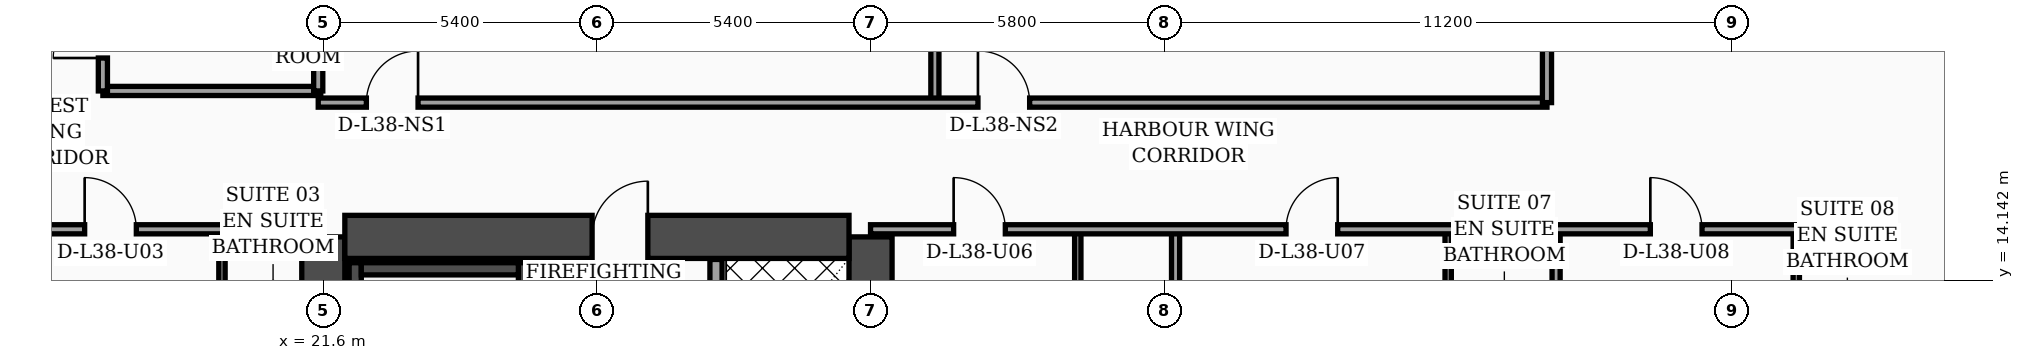
"""IFC4 building model, lengths in metres.
Left out: names, types, materials, properties, quantities, classifications, styles, units other than length and angle.
Written with IfcOpenShell. Run it as: python <this file> out.ifc"""

import sys

from ifc_helpers import new_model, si_unit, direction, frame, frame_2d, origin, place, context, subcontext, project, spatial, rectangle, extrude, element, fill, save


model = new_model("IFC4")
c1 = context("Model", 3, precision=1e-05, world=origin(), true_north=direction((0.0, 1.0)))
c2 = subcontext(c1, "Body", "Model", "MODEL_VIEW")
j1 = project(units=[si_unit("LENGTHUNIT", "METRE"), si_unit("PLANEANGLEUNIT", "RADIAN")], contexts=[c1])
p1 = place(None, origin())
s1 = spatial("IfcSite", under=j1, at=p1, CompositionType="ELEMENT")
p2 = place(p1, origin())
s2 = spatial("IfcBuilding", under=s1, at=p2, CompositionType="ELEMENT")
p3 = place(p2, frame((0.0, 0.0, 156.1)))
s3 = spatial("IfcBuildingStorey", under=s2, at=p3, CompositionType="ELEMENT", Elevation=156.1)
for number, where, z_axis, x_axis in (
    (1, (21.6, 4.6, 0.0), (0.0, 0.0, 1.0), (0.0, 1.0, 0.0)),
    (2, (32.4, 4.6, 0.0), (0.0, 0.0, 1.0), (0.0, 1.0, 0.0)),
):
    element("IfcWall", number, at=place(p3, frame(where, z_axis=z_axis, x_axis=x_axis)), inside=s3, PredefinedType="SHEAR", context=c2, shape_type="SweptSolid", body=[
        extrude(rectangle(XDim=10.4, YDim=0.85, at=frame_2d((5.2, 0.0))), origin(), (0.0, 0.0, 1.0), 3.56),
    ])
p4 = place(p3, frame((22.025, 15.0, 0.0), z_axis=(0.0, 0.0, 1.0), x_axis=(1.0, 0.0, 0.0)))
e3 = element("IfcWall", 3, at=p4, inside=s3, PredefinedType="SHEAR", context=c2, shape_type="SweptSolid", body=[
    extrude(rectangle(XDim=9.95, YDim=0.85, at=frame_2d((4.975, 0.0))), origin(), (0.0, 0.0, 1.0), 3.56),
])
p5 = place(p4, frame((4.88, 0.0, 0.0)))
e4 = element("IfcOpeningElement", 4, at=p5, cuts=e3, PredefinedType="OPENING", context=c2, shape_type="SweptSolid", body=[
    extrude(rectangle(XDim=1.1, YDim=2.2, at=frame_2d((0.55, 1.1))), frame((0.0, 0.435, 0.0), z_axis=(0.0, -1.0, 0.0), x_axis=(1.0, 0.0, 0.0)), (0.0, 0.0, 1.0), 0.87),
])
p6 = place(p3, frame((22.23, 5.025, 0.0), z_axis=(0.0, 0.0, 1.0), x_axis=(0.0, 1.0, 0.0)))
e5 = element("IfcWall", 5, at=p6, inside=s3, PredefinedType="SOLIDWALL", context=c2, shape_type="SweptSolid", body=[
    extrude(rectangle(XDim=9.465, YDim=0.24, at=frame_2d((4.732, 0.0))), origin(), (0.0, 0.0, 1.0), 3.56),
])
p7 = place(p3, frame((25.57, 5.025, 0.0), z_axis=(0.0, 0.0, 1.0), x_axis=(0.0, 1.0, 0.0)))
e6 = element("IfcWall", 6, at=p7, inside=s3, PredefinedType="SOLIDWALL", context=c2, shape_type="SweptSolid", body=[
    extrude(rectangle(XDim=9.465, YDim=0.24, at=frame_2d((4.732, 0.0))), origin(), (0.0, 0.0, 1.0), 3.56),
])
p8 = place(p7, frame((0.35, 0.0, 0.0)))
e7 = element("IfcOpeningElement", 7, at=p8, cuts=e6, PredefinedType="OPENING", context=c2, shape_type="SweptSolid", body=[
    extrude(rectangle(XDim=1.15, YDim=2.2, at=frame_2d((0.575, 1.1))), frame((0.0, 0.13, 0.0), z_axis=(0.0, -1.0, 0.0), x_axis=(1.0, 0.0, 0.0)), (0.0, 0.0, 1.0), 0.26),
])
p9 = place(p3, frame((22.35, 14.37, 0.0), z_axis=(0.0, 0.0, 1.0), x_axis=(1.0, 0.0, 0.0)))
e8 = element("IfcWall", 8, at=p9, inside=s3, PredefinedType="SOLIDWALL", context=c2, shape_type="SweptSolid", body=[
    extrude(rectangle(XDim=3.1, YDim=0.24, at=frame_2d((1.55, 0.0))), origin(), (0.0, 0.0, 1.0), 3.56),
])
p10 = place(p3, frame((59.23, 5.505, 0.0), z_axis=(0.0, 0.0, 1.0), x_axis=(-0.300509063924, 0.953778958931, 0.0)))
e9 = element("IfcWall", 9, at=p10, inside=s3, PredefinedType="SOLIDWALL", context=c2, shape_type="SweptSolid", body=[
    extrude(rectangle(XDim=30.814, YDim=0.32, at=frame_2d((15.407, 0.0))), origin(), (0.0, 0.0, 1.0), 3.56),
])
p11 = place(p10, frame((10.199, 0.0, 0.0)))
e10 = element("IfcOpeningElement", 10, at=p11, cuts=e9, PredefinedType="OPENING", context=c2, shape_type="SweptSolid", body=[
    extrude(rectangle(XDim=1.4, YDim=2.25, at=frame_2d((0.7, 1.125))), frame((0.0, 0.17, 0.0), z_axis=(0.0, -1.0, 0.0), x_axis=(1.0, 0.0, 0.0)), (0.0, 0.0, 1.0), 0.34),
])
p12 = place(p10, frame((1.6, 0.0, 0.75)))
e11 = element("IfcOpeningElement", 11, at=p12, cuts=e9, PredefinedType="OPENING", context=c2, shape_type="SweptSolid", body=[
    extrude(rectangle(XDim=1.5, YDim=1.6, at=frame_2d((0.75, 0.8))), frame((0.0, 0.17, 0.0), z_axis=(0.0, -1.0, 0.0), x_axis=(1.0, 0.0, 0.0)), (0.0, 0.0, 1.0), 0.34),
])
p13 = place(p10, frame((4.7, 0.0, 0.75)))
e12 = element("IfcOpeningElement", 12, at=p13, cuts=e9, PredefinedType="OPENING", context=c2, shape_type="SweptSolid", body=[
    extrude(rectangle(XDim=1.5, YDim=1.6, at=frame_2d((0.75, 0.8))), frame((0.0, 0.17, 0.0), z_axis=(0.0, -1.0, 0.0), x_axis=(1.0, 0.0, 0.0)), (0.0, 0.0, 1.0), 0.34),
])
p14 = place(p10, frame((7.8, 0.0, 0.75)))
e13 = element("IfcOpeningElement", 13, at=p14, cuts=e9, PredefinedType="OPENING", context=c2, shape_type="SweptSolid", body=[
    extrude(rectangle(XDim=1.5, YDim=1.6, at=frame_2d((0.75, 0.8))), frame((0.0, 0.17, 0.0), z_axis=(0.0, -1.0, 0.0), x_axis=(1.0, 0.0, 0.0)), (0.0, 0.0, 1.0), 0.34),
])
p15 = place(p10, frame((14.0, 0.0, 0.75)))
e14 = element("IfcOpeningElement", 14, at=p15, cuts=e9, PredefinedType="OPENING", context=c2, shape_type="SweptSolid", body=[
    extrude(rectangle(XDim=1.5, YDim=1.6, at=frame_2d((0.75, 0.8))), frame((0.0, 0.17, 0.0), z_axis=(0.0, -1.0, 0.0), x_axis=(1.0, 0.0, 0.0)), (0.0, 0.0, 1.0), 0.34),
])
p16 = place(p10, frame((17.1, 0.0, 0.75)))
e15 = element("IfcOpeningElement", 15, at=p16, cuts=e9, PredefinedType="OPENING", context=c2, shape_type="SweptSolid", body=[
    extrude(rectangle(XDim=1.5, YDim=1.6, at=frame_2d((0.75, 0.8))), frame((0.0, 0.17, 0.0), z_axis=(0.0, -1.0, 0.0), x_axis=(1.0, 0.0, 0.0)), (0.0, 0.0, 1.0), 0.34),
])
p17 = place(p10, frame((20.2, 0.0, 0.75)))
e16 = element("IfcOpeningElement", 16, at=p17, cuts=e9, PredefinedType="OPENING", context=c2, shape_type="SweptSolid", body=[
    extrude(rectangle(XDim=1.5, YDim=1.6, at=frame_2d((0.75, 0.8))), frame((0.0, 0.17, 0.0), z_axis=(0.0, -1.0, 0.0), x_axis=(1.0, 0.0, 0.0)), (0.0, 0.0, 1.0), 0.34),
])
p18 = place(p10, frame((23.3, 0.0, 0.75)))
e17 = element("IfcOpeningElement", 17, at=p18, cuts=e9, PredefinedType="OPENING", context=c2, shape_type="SweptSolid", body=[
    extrude(rectangle(XDim=1.5, YDim=1.6, at=frame_2d((0.75, 0.8))), frame((0.0, 0.17, 0.0), z_axis=(0.0, -1.0, 0.0), x_axis=(1.0, 0.0, 0.0)), (0.0, 0.0, 1.0), 0.34),
])
p19 = place(p10, frame((26.4, 0.0, 0.75)))
e18 = element("IfcOpeningElement", 18, at=p19, cuts=e9, PredefinedType="OPENING", context=c2, shape_type="SweptSolid", body=[
    extrude(rectangle(XDim=1.5, YDim=1.6, at=frame_2d((0.75, 0.8))), frame((0.0, 0.17, 0.0), z_axis=(0.0, -1.0, 0.0), x_axis=(1.0, 0.0, 0.0)), (0.0, 0.0, 1.0), 0.34),
])
p20 = place(p3, frame((29.35, 5.045, 0.0), z_axis=(0.0, 0.0, 1.0), x_axis=(0.0, 1.0, 0.0)))
e19 = element("IfcWall", 19, at=p20, inside=s3, PredefinedType="SOLIDWALL", context=c2, shape_type="SweptSolid", body=[
    extrude(rectangle(XDim=9.51, YDim=0.24, at=frame_2d((4.755, 0.0))), origin(), (0.0, 0.0, 1.0), 3.56),
])
p21 = place(p20, frame((0.55, 0.0, 0.0)))
e20 = element("IfcOpeningElement", 20, at=p21, cuts=e19, PredefinedType="OPENING", context=c2, shape_type="SweptSolid", body=[
    extrude(rectangle(XDim=1.3, YDim=2.35, at=frame_2d((0.65, 1.175))), frame((0.0, 0.13, 0.0), z_axis=(0.0, -1.0, 0.0), x_axis=(1.0, 0.0, 0.0)), (0.0, 0.0, 1.0), 0.26),
])
p22 = place(p3, frame((19.6, 2.44, 0.0), z_axis=(0.0, 0.0, 1.0), x_axis=(0.0, 1.0, 0.0)))
e21 = element("IfcWall", 21, at=p22, inside=s3, PredefinedType="PARTITIONING", context=c2, shape_type="SweptSolid", body=[
    extrude(rectangle(XDim=12.71, YDim=0.125, at=frame_2d((6.355, 0.0))), origin(), (0.0, 0.0, 1.0), 2.49),
])
p23 = place(p22, frame((4.34, 0.0, 0.0)))
e22 = element("IfcOpeningElement", 22, at=p23, cuts=e21, PredefinedType="OPENING", context=c2, shape_type="SweptSolid", body=[
    extrude(rectangle(XDim=0.96, YDim=2.2, at=frame_2d((0.48, 1.1))), frame((0.0, 0.073, 0.0), z_axis=(0.0, -1.0, 0.0), x_axis=(1.0, 0.0, 0.0)), (0.0, 0.0, 1.0), 0.145),
])
p24 = place(p22, frame((10.18, 0.0, 0.0)))
e23 = element("IfcOpeningElement", 23, at=p24, cuts=e21, PredefinedType="OPENING", context=c2, shape_type="SweptSolid", body=[
    extrude(rectangle(XDim=0.9, YDim=2.15, at=frame_2d((0.45, 1.075))), frame((0.0, 0.073, 0.0), z_axis=(0.0, -1.0, 0.0), x_axis=(1.0, 0.0, 0.0)), (0.0, 0.0, 1.0), 0.145),
])
p25 = place(p3, frame((15.15, 15.15, 0.0), z_axis=(0.0, 0.0, 1.0), x_axis=(1.0, 0.0, 0.0)))
e24 = element("IfcWall", 24, at=p25, inside=s3, PredefinedType="PARTITIONING", context=c2, shape_type="SweptSolid", body=[
    extrude(rectangle(XDim=6.45, YDim=0.18, at=frame_2d((3.225, 0.0))), origin(), (0.0, 0.0, 1.0), 2.49),
])
p26 = place(p25, frame((1.74, 0.0, 0.0)))
e25 = element("IfcOpeningElement", 25, at=p26, cuts=e24, PredefinedType="OPENING", context=c2, shape_type="SweptSolid", body=[
    extrude(rectangle(XDim=1.02, YDim=2.2, at=frame_2d((0.51, 1.1))), frame((0.0, 0.1, 0.0), z_axis=(0.0, -1.0, 0.0), x_axis=(1.0, 0.0, 0.0)), (0.0, 0.0, 1.0), 0.2),
])
p27 = place(p3, frame((17.25, 17.88, 0.0), z_axis=(0.0, 0.0, 1.0), x_axis=(1.0, 0.0, 0.0)))
e26 = element("IfcWall", 26, at=p27, inside=s3, PredefinedType="PARTITIONING", context=c2, shape_type="SweptSolid", body=[
    extrude(rectangle(XDim=4.3, YDim=0.18, at=frame_2d((2.15, 0.0))), origin(), (0.0, 0.0, 1.0), 3.56),
])
p28 = place(p3, frame((21.5, 17.88, 0.0), z_axis=(0.0, 0.0, 1.0), x_axis=(0.0, 1.0, 0.0)))
e27 = element("IfcWall", 27, at=p28, inside=s3, PredefinedType="PARTITIONING", context=c2, shape_type="SweptSolid", body=[
    extrude(rectangle(XDim=6.44, YDim=0.18, at=frame_2d((3.22, 0.0))), origin(), (0.0, 0.0, 1.0), 3.09),
])
p29 = place(p3, frame((17.25, 17.88, 0.0), z_axis=(0.0, 0.0, 1.0), x_axis=(0.0, 1.0, 0.0)))
e28 = element("IfcWall", 28, at=p29, inside=s3, PredefinedType="PARTITIONING", context=c2, shape_type="SweptSolid", body=[
    extrude(rectangle(XDim=6.44, YDim=0.18, at=frame_2d((3.22, 0.0))), origin(), (0.0, 0.0, 1.0), 3.09),
])
p30 = place(p29, frame((0.65, 0.0, 0.0)))
e29 = element("IfcOpeningElement", 29, at=p30, cuts=e28, PredefinedType="OPENING", context=c2, shape_type="SweptSolid", body=[
    extrude(rectangle(XDim=0.98, YDim=2.15, at=frame_2d((0.49, 1.075))), frame((0.0, 0.1, 0.0), z_axis=(0.0, -1.0, 0.0), x_axis=(1.0, 0.0, 0.0)), (0.0, 0.0, 1.0), 0.2),
])
p31 = place(p29, frame((3.27, 0.0, 0.0)))
e30 = element("IfcOpeningElement", 30, at=p31, cuts=e28, PredefinedType="OPENING", context=c2, shape_type="SweptSolid", body=[
    extrude(rectangle(XDim=0.96, YDim=2.2, at=frame_2d((0.48, 1.1))), frame((0.0, 0.1, 0.0), z_axis=(0.0, -1.0, 0.0), x_axis=(1.0, 0.0, 0.0)), (0.0, 0.0, 1.0), 0.2),
])
p32 = place(p3, frame((36.49, 2.44, 0.0), z_axis=(0.0, 0.0, 1.0), x_axis=(0.0, 1.0, 0.0)))
e31 = element("IfcWall", 31, at=p32, inside=s3, PredefinedType="PARTITIONING", context=c2, shape_type="SweptSolid", body=[
    extrude(rectangle(XDim=12.71, YDim=0.125, at=frame_2d((6.355, 0.0))), origin(), (0.0, 0.0, 1.0), 2.94),
])
p33 = place(p32, frame((4.35, 0.0, 0.0)))
e32 = element("IfcOpeningElement", 32, at=p33, cuts=e31, PredefinedType="OPENING", context=c2, shape_type="SweptSolid", body=[
    extrude(rectangle(XDim=0.96, YDim=2.2, at=frame_2d((0.48, 1.1))), frame((0.0, 0.073, 0.0), z_axis=(0.0, -1.0, 0.0), x_axis=(1.0, 0.0, 0.0)), (0.0, 0.0, 1.0), 0.145),
])
p34 = place(p32, frame((10.21, 0.0, 0.0)))
e33 = element("IfcOpeningElement", 33, at=p34, cuts=e31, PredefinedType="OPENING", context=c2, shape_type="SweptSolid", body=[
    extrude(rectangle(XDim=0.9, YDim=2.15, at=frame_2d((0.45, 1.075))), frame((0.0, 0.073, 0.0), z_axis=(0.0, -1.0, 0.0), x_axis=(1.0, 0.0, 0.0)), (0.0, 0.0, 1.0), 0.145),
])
p35 = place(p3, frame((43.8, 2.44, 0.0), z_axis=(0.0, 0.0, 1.0), x_axis=(0.0, 1.0, 0.0)))
e34 = element("IfcWall", 34, at=p35, inside=s3, PredefinedType="PARTITIONING", context=c2, shape_type="SweptSolid", body=[
    extrude(rectangle(XDim=12.71, YDim=0.125, at=frame_2d((6.355, 0.0))), origin(), (0.0, 0.0, 1.0), 3.04),
])
p36 = place(p35, frame((4.35, 0.0, 0.0)))
e35 = element("IfcOpeningElement", 35, at=p36, cuts=e34, PredefinedType="OPENING", context=c2, shape_type="SweptSolid", body=[
    extrude(rectangle(XDim=0.96, YDim=2.2, at=frame_2d((0.48, 1.1))), frame((0.0, 0.073, 0.0), z_axis=(0.0, -1.0, 0.0), x_axis=(1.0, 0.0, 0.0)), (0.0, 0.0, 1.0), 0.145),
])
p37 = place(p35, frame((10.21, 0.0, 0.0)))
e36 = element("IfcOpeningElement", 36, at=p37, cuts=e34, PredefinedType="OPENING", context=c2, shape_type="SweptSolid", body=[
    extrude(rectangle(XDim=0.9, YDim=2.15, at=frame_2d((0.45, 1.075))), frame((0.0, 0.073, 0.0), z_axis=(0.0, -1.0, 0.0), x_axis=(1.0, 0.0, 0.0)), (0.0, 0.0, 1.0), 0.145),
])
p38 = place(p3, frame((38.42, 2.44, 0.0), z_axis=(0.0, 0.0, 1.0), x_axis=(0.0, 1.0, 0.0)))
e37 = element("IfcWall", 37, at=p38, inside=s3, PredefinedType="PARTITIONING", context=c2, shape_type="SweptSolid", body=[
    extrude(rectangle(XDim=12.71, YDim=0.16, at=frame_2d((6.355, 0.0))), origin(), (0.0, 0.0, 1.0), 2.94),
])
p39 = place(p3, frame((50.67, 2.44, 0.0), z_axis=(0.0, 0.0, 1.0), x_axis=(0.0, 1.0, 0.0)))
e38 = element("IfcWall", 38, at=p39, inside=s3, PredefinedType="PARTITIONING", context=c2, shape_type="SweptSolid", body=[
    extrude(rectangle(XDim=12.71, YDim=0.125, at=frame_2d((6.355, 0.0))), origin(), (0.0, 0.0, 1.0), 3.04),
])
p40 = place(p39, frame((4.35, 0.0, 0.0)))
e39 = element("IfcOpeningElement", 39, at=p40, cuts=e38, PredefinedType="OPENING", context=c2, shape_type="SweptSolid", body=[
    extrude(rectangle(XDim=0.96, YDim=2.2, at=frame_2d((0.48, 1.1))), frame((0.0, 0.073, 0.0), z_axis=(0.0, -1.0, 0.0), x_axis=(1.0, 0.0, 0.0)), (0.0, 0.0, 1.0), 0.145),
])
p41 = place(p39, frame((10.21, 0.0, 0.0)))
e40 = element("IfcOpeningElement", 40, at=p41, cuts=e38, PredefinedType="OPENING", context=c2, shape_type="SweptSolid", body=[
    extrude(rectangle(XDim=0.9, YDim=2.15, at=frame_2d((0.45, 1.075))), frame((0.0, 0.073, 0.0), z_axis=(0.0, -1.0, 0.0), x_axis=(1.0, 0.0, 0.0)), (0.0, 0.0, 1.0), 0.145),
])
p42 = place(p3, frame((45.93, 2.44, 0.0), z_axis=(0.0, 0.0, 1.0), x_axis=(0.0, 1.0, 0.0)))
e41 = element("IfcWall", 41, at=p42, inside=s3, PredefinedType="PARTITIONING", context=c2, shape_type="SweptSolid", body=[
    extrude(rectangle(XDim=12.71, YDim=0.16, at=frame_2d((6.355, 0.0))), origin(), (0.0, 0.0, 1.0), 3.04),
])
p43 = place(p3, frame((32.4, 15.15, 0.0), z_axis=(0.0, 0.0, 1.0), x_axis=(1.0, 0.0, 0.0)))
e42 = element("IfcWall", 42, at=p43, inside=s3, PredefinedType="PARTITIONING", context=c2, shape_type="SweptSolid", body=[
    extrude(rectangle(XDim=20.2, YDim=0.18, at=frame_2d((10.1, 0.0))), origin(), (0.0, 0.0, 1.0), 2.94),
])
p44 = place(p43, frame((1.64, 0.0, 0.0)))
e43 = element("IfcOpeningElement", 43, at=p44, cuts=e42, PredefinedType="OPENING", context=c2, shape_type="SweptSolid", body=[
    extrude(rectangle(XDim=1.02, YDim=2.2, at=frame_2d((0.51, 1.1))), frame((0.0, 0.1, 0.0), z_axis=(0.0, -1.0, 0.0), x_axis=(1.0, 0.0, 0.0)), (0.0, 0.0, 1.0), 0.2),
])
p45 = place(p43, frame((8.2, 0.0, 0.0)))
e44 = element("IfcOpeningElement", 44, at=p45, cuts=e42, PredefinedType="OPENING", context=c2, shape_type="SweptSolid", body=[
    extrude(rectangle(XDim=1.02, YDim=2.2, at=frame_2d((0.51, 1.1))), frame((0.0, 0.1, 0.0), z_axis=(0.0, -1.0, 0.0), x_axis=(1.0, 0.0, 0.0)), (0.0, 0.0, 1.0), 0.2),
])
p46 = place(p43, frame((15.39, 0.0, 0.0)))
e45 = element("IfcOpeningElement", 45, at=p46, cuts=e42, PredefinedType="OPENING", context=c2, shape_type="SweptSolid", body=[
    extrude(rectangle(XDim=1.02, YDim=2.2, at=frame_2d((0.51, 1.1))), frame((0.0, 0.1, 0.0), z_axis=(0.0, -1.0, 0.0), x_axis=(1.0, 0.0, 0.0)), (0.0, 0.0, 1.0), 0.2),
])
p47 = place(p3, frame((33.67, 17.65, 0.0), z_axis=(0.0, 0.0, 1.0), x_axis=(0.0, 1.0, 0.0)))
e46 = element("IfcWall", 46, at=p47, inside=s3, PredefinedType="PARTITIONING", context=c2, shape_type="SweptSolid", body=[
    extrude(rectangle(XDim=13.56, YDim=0.16, at=frame_2d((6.78, 0.0))), origin(), (0.0, 0.0, 1.0), 2.94),
])
p48 = place(p3, frame((21.5, 17.65, 0.0), z_axis=(0.0, 0.0, 1.0), x_axis=(1.0, 0.0, 0.0)))
e47 = element("IfcWall", 47, at=p48, inside=s3, PredefinedType="PARTITIONING", context=c2, shape_type="SweptSolid", body=[
    extrude(rectangle(XDim=24.25, YDim=0.18, at=frame_2d((12.125, 0.0))), origin(), (0.0, 0.0, 1.0), 2.94),
])
p49 = place(p48, frame((0.95, 0.0, 0.0)))
e48 = element("IfcOpeningElement", 48, at=p49, cuts=e47, PredefinedType="OPENING", context=c2, shape_type="SweptSolid", body=[
    extrude(rectangle(XDim=1.02, YDim=2.2, at=frame_2d((0.51, 1.1))), frame((0.0, 0.1, 0.0), z_axis=(0.0, -1.0, 0.0), x_axis=(1.0, 0.0, 0.0)), (0.0, 0.0, 1.0), 0.2),
])
p50 = place(p48, frame((13.02, 0.0, 0.0)))
e49 = element("IfcOpeningElement", 49, at=p50, cuts=e47, PredefinedType="OPENING", context=c2, shape_type="SweptSolid", body=[
    extrude(rectangle(XDim=1.02, YDim=2.2, at=frame_2d((0.51, 1.1))), frame((0.0, 0.1, 0.0), z_axis=(0.0, -1.0, 0.0), x_axis=(1.0, 0.0, 0.0)), (0.0, 0.0, 1.0), 0.2),
])
p51 = place(p3, frame((45.75, 17.65, 0.0), z_axis=(0.0, 0.0, 1.0), x_axis=(0.0, 1.0, 0.0)))
e50 = element("IfcWall", 50, at=p51, inside=s3, PredefinedType="PARTITIONING", context=c2, shape_type="SweptSolid", body=[
    extrude(rectangle(XDim=20.29, YDim=0.18, at=frame_2d((10.145, 0.0))), origin(), (0.0, 0.0, 1.0), 2.94),
])
p52 = place(p26, origin())
e51 = element("IfcDoor", 51, at=p52, inside=s3, OperationType="SINGLE_SWING_LEFT", PredefinedType="DOOR", context=c2, shape_type="SweptSolid", body=[
    extrude(rectangle(XDim=1.02, YDim=2.2, at=frame_2d((0.51, 1.1))), frame((0.0, 0.025, 0.0), z_axis=(0.0, -1.0, 0.0), x_axis=(1.0, 0.0, 0.0)), (0.0, 0.0, 1.0), 0.05),
])
fill(e25, e51)
p53 = place(p30, origin())
e52 = element("IfcDoor", 52, at=p53, inside=s3, OperationType="SINGLE_SWING_LEFT", PredefinedType="DOOR", context=c2, shape_type="SweptSolid", body=[
    extrude(rectangle(XDim=0.98, YDim=2.15, at=frame_2d((0.49, 1.075))), frame((0.0, 0.025, 0.0), z_axis=(0.0, -1.0, 0.0), x_axis=(1.0, 0.0, 0.0)), (0.0, 0.0, 1.0), 0.05),
])
fill(e29, e52)
p54 = place(p44, origin())
e53 = element("IfcDoor", 53, at=p54, inside=s3, OperationType="SINGLE_SWING_LEFT", PredefinedType="DOOR", context=c2, shape_type="SweptSolid", body=[
    extrude(rectangle(XDim=1.02, YDim=2.2, at=frame_2d((0.51, 1.1))), frame((0.0, 0.025, 0.0), z_axis=(0.0, -1.0, 0.0), x_axis=(1.0, 0.0, 0.0)), (0.0, 0.0, 1.0), 0.05),
])
fill(e43, e53)
p55 = place(p45, origin())
e54 = element("IfcDoor", 54, at=p55, inside=s3, OperationType="SINGLE_SWING_RIGHT", PredefinedType="DOOR", context=c2, shape_type="SweptSolid", body=[
    extrude(rectangle(XDim=1.02, YDim=2.2, at=frame_2d((0.51, 1.1))), frame((0.0, 0.025, 0.0), z_axis=(0.0, -1.0, 0.0), x_axis=(1.0, 0.0, 0.0)), (0.0, 0.0, 1.0), 0.05),
])
fill(e44, e54)
p56 = place(p46, origin())
e55 = element("IfcDoor", 55, at=p56, inside=s3, OperationType="SINGLE_SWING_LEFT", PredefinedType="DOOR", context=c2, shape_type="SweptSolid", body=[
    extrude(rectangle(XDim=1.02, YDim=2.2, at=frame_2d((0.51, 1.1))), frame((0.0, 0.025, 0.0), z_axis=(0.0, -1.0, 0.0), x_axis=(1.0, 0.0, 0.0)), (0.0, 0.0, 1.0), 0.05),
])
fill(e45, e55)
p57 = place(p49, origin())
e56 = element("IfcDoor", 56, at=p57, inside=s3, OperationType="SINGLE_SWING_RIGHT", PredefinedType="DOOR", context=c2, shape_type="SweptSolid", body=[
    extrude(rectangle(XDim=1.02, YDim=2.2, at=frame_2d((0.51, 1.1))), frame((0.0, 0.025, 0.0), z_axis=(0.0, -1.0, 0.0), x_axis=(1.0, 0.0, 0.0)), (0.0, 0.0, 1.0), 0.05),
])
fill(e48, e56)
p58 = place(p50, origin())
e57 = element("IfcDoor", 57, at=p58, inside=s3, OperationType="SINGLE_SWING_LEFT", PredefinedType="DOOR", context=c2, shape_type="SweptSolid", body=[
    extrude(rectangle(XDim=1.02, YDim=2.2, at=frame_2d((0.51, 1.1))), frame((0.0, 0.025, 0.0), z_axis=(0.0, -1.0, 0.0), x_axis=(1.0, 0.0, 0.0)), (0.0, 0.0, 1.0), 0.05),
])
fill(e49, e57)
p59 = place(p5, origin())
e58 = element("IfcDoor", 58, at=p59, inside=s3, OperationType="SINGLE_SWING_RIGHT", PredefinedType="DOOR", context=c2, shape_type="SweptSolid", body=[
    extrude(rectangle(XDim=1.1, YDim=2.2, at=frame_2d((0.55, 1.1))), frame((0.0, 0.025, 0.0), z_axis=(0.0, -1.0, 0.0), x_axis=(1.0, 0.0, 0.0)), (0.0, 0.0, 1.0), 0.05),
])
fill(e4, e58)
save(model, sys.argv[1])
